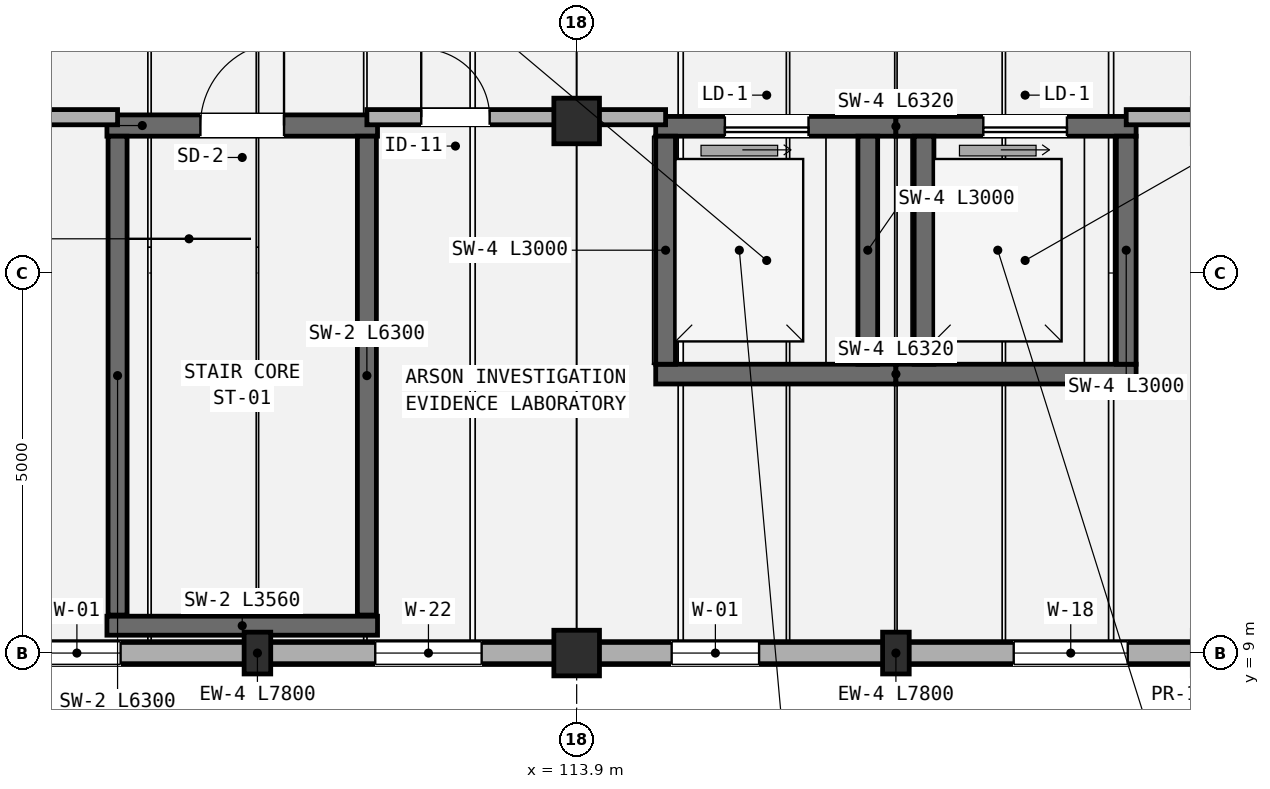
"""IFC4 building model, lengths in metres.
Left out: names, types, materials, properties, quantities, classifications, styles, units other than length and angle.
Written with IfcOpenShell. Run it as: python <this file> out.ifc"""

import sys

from ifc_helpers import new_model, si_unit, direction, frame, frame_2d, origin, origin_2d, place, context, subcontext, project, spatial, polyline, rectangle, outline, extrude, element, fill, save


model = new_model("IFC4")
c1 = context("Model", 3, precision=1e-05, world=origin(), true_north=direction((0.0, 1.0)))
c2 = subcontext(c1, "Body", "Model", "MODEL_VIEW")
j1 = project(units=[si_unit("LENGTHUNIT", "METRE"), si_unit("PLANEANGLEUNIT", "RADIAN")], contexts=[c1])
p1 = place(None, origin())
s1 = spatial("IfcSite", under=j1, at=p1, CompositionType="ELEMENT")
p2 = place(p1, origin())
s2 = spatial("IfcBuilding", under=s1, at=p2, CompositionType="ELEMENT")
p3 = place(p2, frame((0.0, 0.0, 12.75)))
s3 = spatial("IfcBuildingStorey", under=s2, at=p3, CompositionType="ELEMENT", Elevation=12.75)
for number, where, z_axis, x_axis in (
    (1, (113.9, 9.0, 0.0), (0.0, 0.0, 1.0), (1.0, 0.0, 0.0)),
    (2, (113.9, 16.0, 0.0), (0.0, 0.0, 1.0), (1.0, 0.0, 0.0)),
):
    element("IfcColumn", number, at=place(p3, frame(where, z_axis=z_axis, x_axis=x_axis)), inside=s3, PredefinedType="COLUMN", context=c2, shape_type="SweptSolid", body=[
        extrude(rectangle(XDim=0.6, YDim=0.6, at=origin_2d()), origin(), (0.0, 0.0, 1.0), 3.0),
    ])
for number, where, z_axis, x_axis in (
    (3, (109.7, 9.0, 0.0), (0.0, 0.0, 1.0), (1.0, 0.0, 0.0)),
    (4, (118.1, 9.0, 0.0), (0.0, 0.0, 1.0), (1.0, 0.0, 0.0)),
):
    element("IfcColumn", number, at=place(p3, frame(where, z_axis=z_axis, x_axis=x_axis)), inside=s3, PredefinedType="PILASTER", context=c2, shape_type="SweptSolid", body=[
        extrude(rectangle(XDim=0.35, YDim=0.55, at=origin_2d()), origin(), (0.0, 0.0, 1.0), 3.0),
    ])
p4 = place(p3, frame((105.8, 9.0, 0.0), z_axis=(0.0, 0.0, 1.0), x_axis=(1.0, 0.0, 0.0)))
e5 = element("IfcWall", 5, at=p4, inside=s3, PredefinedType="STANDARD", context=c2, shape_type="SweptSolid", body=[
    extrude(rectangle(XDim=7.8, YDim=0.3, at=frame_2d((3.9, 0.0))), origin(), (0.0, 0.0, 1.0), 2.29),
])
p5 = place(p4, frame((0.95, 0.0, 0.6)))
e6 = element("IfcOpeningElement", 6, at=p5, cuts=e5, PredefinedType="OPENING", context=c2, shape_type="SweptSolid", body=[
    extrude(rectangle(XDim=1.15, YDim=1.45, at=frame_2d((0.575, 0.725))), frame((0.0, 0.16, 0.0), z_axis=(0.0, -1.0, 0.0), x_axis=(1.0, 0.0, 0.0)), (0.0, 0.0, 1.0), 0.32),
])
p6 = place(p4, frame((5.45, 0.0, 0.6)))
e7 = element("IfcOpeningElement", 7, at=p6, cuts=e5, PredefinedType="OPENING", context=c2, shape_type="SweptSolid", body=[
    extrude(rectangle(XDim=1.4, YDim=1.45, at=frame_2d((0.7, 0.725))), frame((0.0, 0.16, 0.0), z_axis=(0.0, -1.0, 0.0), x_axis=(1.0, 0.0, 0.0)), (0.0, 0.0, 1.0), 0.32),
])
p7 = place(p3, frame((114.2, 9.0, 0.0), z_axis=(0.0, 0.0, 1.0), x_axis=(1.0, 0.0, 0.0)))
e8 = element("IfcWall", 8, at=p7, inside=s3, PredefinedType="STANDARD", context=c2, shape_type="SweptSolid", body=[
    extrude(rectangle(XDim=7.8, YDim=0.3, at=frame_2d((3.9, 0.0))), origin(), (0.0, 0.0, 1.0), 2.29),
])
p8 = place(p7, frame((0.95, 0.0, 0.6)))
e9 = element("IfcOpeningElement", 9, at=p8, cuts=e8, PredefinedType="OPENING", context=c2, shape_type="SweptSolid", body=[
    extrude(rectangle(XDim=1.15, YDim=1.45, at=frame_2d((0.575, 0.725))), frame((0.0, 0.16, 0.0), z_axis=(0.0, -1.0, 0.0), x_axis=(1.0, 0.0, 0.0)), (0.0, 0.0, 1.0), 0.32),
])
p9 = place(p7, frame((5.45, 0.0, 0.65)))
e10 = element("IfcOpeningElement", 10, at=p9, cuts=e8, PredefinedType="OPENING", context=c2, shape_type="SweptSolid", body=[
    extrude(rectangle(XDim=1.5, YDim=1.4, at=frame_2d((0.75, 0.7))), frame((0.0, 0.16, 0.0), z_axis=(0.0, -1.0, 0.0), x_axis=(1.0, 0.0, 0.0)), (0.0, 0.0, 1.0), 0.32),
])
p10 = place(p3, frame((105.5, 9.0, 3.0), z_axis=(0.0, 0.0, 1.0), x_axis=(1.0, 0.0, 0.0)))
e11 = element("IfcWall", 11, at=p10, inside=s3, PredefinedType="PARAPET", context=c2, shape_type="SweptSolid", body=[
    extrude(outline(polyline([(0.0, 0.0), (8.4, 0.0), (8.4, 0.8), (7.468, 0.8), (7.467, 0.913), (6.534, 0.913), (6.533, 1.025), (5.601, 1.025), (5.6, 1.137), (4.668, 1.137), (4.667, 1.25), (3.734, 1.25), (3.733, 1.137), (2.801, 1.137), (2.8, 1.025), (1.868, 1.025), (1.867, 0.913), (0.934, 0.913), (0.933, 0.8), (0.0, 0.8), (0.0, 0.0)])), frame((0.0, 0.14, 0.0), z_axis=(0.0, -1.0, 0.0), x_axis=(1.0, 0.0, 0.0)), (0.0, 0.0, 1.0), 0.28),
])
p11 = place(p3, frame((113.9, 9.0, 3.0), z_axis=(0.0, 0.0, 1.0), x_axis=(1.0, 0.0, 0.0)))
e12 = element("IfcWall", 12, at=p11, inside=s3, PredefinedType="PARAPET", context=c2, shape_type="SweptSolid", body=[
    extrude(outline(polyline([(0.0, 0.0), (8.4, 0.0), (8.4, 0.8), (7.468, 0.8), (7.467, 0.913), (6.534, 0.913), (6.533, 1.025), (5.601, 1.025), (5.6, 1.137), (4.668, 1.137), (4.667, 1.25), (3.734, 1.25), (3.733, 1.137), (2.801, 1.137), (2.8, 1.025), (1.868, 1.025), (1.867, 0.913), (0.934, 0.913), (0.933, 0.8), (0.0, 0.8), (0.0, 0.0)])), frame((0.0, 0.14, 0.0), z_axis=(0.0, -1.0, 0.0), x_axis=(1.0, 0.0, 0.0)), (0.0, 0.0, 1.0), 0.28),
])
p12 = place(p3, frame((107.72, 15.94, 0.0), z_axis=(0.0, 0.0, 1.0), x_axis=(1.0, 0.0, 0.0)))
e13 = element("IfcWall", 13, at=p12, inside=s3, PredefinedType="SHEAR", context=c2, shape_type="SweptSolid", body=[
    extrude(rectangle(XDim=3.56, YDim=0.28, at=frame_2d((1.78, 0.0))), origin(), (0.0, 0.0, 1.0), 2.9),
])
p13 = place(p12, frame((1.23, 0.0, 0.0)))
e14 = element("IfcOpeningElement", 14, at=p13, cuts=e13, PredefinedType="OPENING", context=c2, shape_type="SweptSolid", body=[
    extrude(rectangle(XDim=1.1, YDim=2.15, at=frame_2d((0.55, 1.075))), frame((0.0, 0.15, 0.0), z_axis=(0.0, -1.0, 0.0), x_axis=(1.0, 0.0, 0.0)), (0.0, 0.0, 1.0), 0.3),
])
p14 = place(p3, frame((111.28, 9.36, 0.0), z_axis=(0.0, 0.0, 1.0), x_axis=(-1.0, 0.0, 0.0)))
e15 = element("IfcWall", 15, at=p14, inside=s3, PredefinedType="SHEAR", context=c2, shape_type="SweptSolid", body=[
    extrude(rectangle(XDim=3.56, YDim=0.25, at=frame_2d((1.78, 0.0))), origin(), (0.0, 0.0, 1.0), 2.9),
])
for number, where, z_axis, x_axis in (
    (16, (107.86, 15.8, 0.0), (0.0, 0.0, 1.0), (0.0, -1.0, 0.0)),
    (17, (111.14, 9.5, 0.0), (0.0, 0.0, 1.0), (0.0, 1.0, 0.0)),
):
    element("IfcWall", number, at=place(p3, frame(where, z_axis=z_axis, x_axis=x_axis)), inside=s3, PredefinedType="SHEAR", context=c2, shape_type="SweptSolid", body=[
        extrude(rectangle(XDim=6.3, YDim=0.25, at=frame_2d((3.15, 0.0))), origin(), (0.0, 0.0, 1.0), 2.9),
    ])
p15 = place(p3, frame((114.94, 12.67, 0.0), z_axis=(0.0, 0.0, 1.0), x_axis=(1.0, 0.0, 0.0)))
e18 = element("IfcWall", 18, at=p15, inside=s3, PredefinedType="SHEAR", context=c2, shape_type="SweptSolid", body=[
    extrude(rectangle(XDim=3.16, YDim=0.26, at=frame_2d((1.58, 0.0))), origin(), (0.0, 0.0, 1.0), 2.9),
])
p16 = place(p3, frame((118.1, 15.93, 0.0), z_axis=(0.0, 0.0, 1.0), x_axis=(-1.0, 0.0, 0.0)))
e19 = element("IfcWall", 19, at=p16, inside=s3, PredefinedType="SHEAR", context=c2, shape_type="SweptSolid", body=[
    extrude(rectangle(XDim=3.16, YDim=0.26, at=frame_2d((1.58, 0.0))), origin(), (0.0, 0.0, 1.0), 2.9),
])
p17 = place(p16, frame((1.15, 0.0, 0.0)))
e20 = element("IfcOpeningElement", 20, at=p17, cuts=e19, PredefinedType="OPENING", context=c2, shape_type="SweptSolid", body=[
    extrude(rectangle(XDim=1.1, YDim=2.15, at=frame_2d((0.55, 1.075))), frame((0.0, 0.14, 0.0), z_axis=(0.0, -1.0, 0.0), x_axis=(1.0, 0.0, 0.0)), (0.0, 0.0, 1.0), 0.28),
])
for number, where, z_axis, x_axis in (
    (21, (115.07, 15.8, 0.0), (0.0, 0.0, 1.0), (0.0, -1.0, 0.0)),
    (22, (117.73, 12.8, 0.0), (0.0, 0.0, 1.0), (0.0, 1.0, 0.0)),
):
    element("IfcWall", number, at=place(p3, frame(where, z_axis=z_axis, x_axis=x_axis)), inside=s3, PredefinedType="SHEAR", context=c2, shape_type="SweptSolid", body=[
        extrude(rectangle(XDim=3.0, YDim=0.26, at=frame_2d((1.5, 0.0))), origin(), (0.0, 0.0, 1.0), 2.9),
    ])
p18 = place(p3, frame((118.1, 12.67, 0.0), z_axis=(0.0, 0.0, 1.0), x_axis=(1.0, 0.0, 0.0)))
e23 = element("IfcWall", 23, at=p18, inside=s3, PredefinedType="SHEAR", context=c2, shape_type="SweptSolid", body=[
    extrude(rectangle(XDim=3.16, YDim=0.26, at=frame_2d((1.58, 0.0))), origin(), (0.0, 0.0, 1.0), 2.9),
])
p19 = place(p3, frame((121.26, 15.93, 0.0), z_axis=(0.0, 0.0, 1.0), x_axis=(-1.0, 0.0, 0.0)))
e24 = element("IfcWall", 24, at=p19, inside=s3, PredefinedType="SHEAR", context=c2, shape_type="SweptSolid", body=[
    extrude(rectangle(XDim=3.16, YDim=0.26, at=frame_2d((1.58, 0.0))), origin(), (0.0, 0.0, 1.0), 2.9),
])
p20 = place(p19, frame((0.91, 0.0, 0.0)))
e25 = element("IfcOpeningElement", 25, at=p20, cuts=e24, PredefinedType="OPENING", context=c2, shape_type="SweptSolid", body=[
    extrude(rectangle(XDim=1.1, YDim=2.15, at=frame_2d((0.55, 1.075))), frame((0.0, 0.14, 0.0), z_axis=(0.0, -1.0, 0.0), x_axis=(1.0, 0.0, 0.0)), (0.0, 0.0, 1.0), 0.28),
])
for number, where, z_axis, x_axis in (
    (26, (118.47, 15.8, 0.0), (0.0, 0.0, 1.0), (0.0, -1.0, 0.0)),
    (27, (121.13, 12.8, 0.0), (0.0, 0.0, 1.0), (0.0, 1.0, 0.0)),
):
    element("IfcWall", number, at=place(p3, frame(where, z_axis=z_axis, x_axis=x_axis)), inside=s3, PredefinedType="SHEAR", context=c2, shape_type="SweptSolid", body=[
        extrude(rectangle(XDim=3.0, YDim=0.26, at=frame_2d((1.5, 0.0))), origin(), (0.0, 0.0, 1.0), 2.9),
    ])
p21 = place(p3, frame((105.65, 16.05, 0.0), z_axis=(0.0, 0.0, 1.0), x_axis=(1.0, 0.0, 0.0)))
e28 = element("IfcWall", 28, at=p21, inside=s3, PredefinedType="PARTITIONING", context=c2, shape_type="SweptSolid", body=[
    extrude(rectangle(XDim=2.21, YDim=0.2, at=frame_2d((1.105, 0.0))), origin(), (0.0, 0.0, 1.0), 2.3),
])
p22 = place(p3, frame((111.14, 16.05, 0.0), z_axis=(0.0, 0.0, 1.0), x_axis=(1.0, 0.0, 0.0)))
e29 = element("IfcWall", 29, at=p22, inside=s3, PredefinedType="PARTITIONING", context=c2, shape_type="SweptSolid", body=[
    extrude(rectangle(XDim=3.93, YDim=0.2, at=frame_2d((1.965, 0.0))), origin(), (0.0, 0.0, 1.0), 2.3),
])
p23 = place(p22, frame((0.715, 0.0, 0.0)))
e30 = element("IfcOpeningElement", 30, at=p23, cuts=e29, PredefinedType="OPENING", context=c2, shape_type="SweptSolid", body=[
    extrude(rectangle(XDim=0.9, YDim=2.08, at=frame_2d((0.45, 1.04))), frame((0.0, 0.11, 0.0), z_axis=(0.0, -1.0, 0.0), x_axis=(1.0, 0.0, 0.0)), (0.0, 0.0, 1.0), 0.22),
])
p24 = place(p3, frame((121.13, 16.05, 0.0), z_axis=(0.0, 0.0, 1.0), x_axis=(1.0, 0.0, 0.0)))
e31 = element("IfcWall", 31, at=p24, inside=s3, PredefinedType="PARTITIONING", context=c2, shape_type="SweptSolid", body=[
    extrude(rectangle(XDim=3.73, YDim=0.2, at=frame_2d((1.865, 0.0))), origin(), (0.0, 0.0, 1.0), 2.3),
])
p25 = place(p5, origin())
e32 = element("IfcWindow", 32, at=p25, inside=s3, PartitioningType="SINGLE_PANEL", PredefinedType="WINDOW", context=c2, shape_type="SweptSolid", body=[
    extrude(rectangle(XDim=1.15, YDim=1.45, at=frame_2d((0.575, 0.725))), frame((0.0, 0.03, 0.0), z_axis=(0.0, -1.0, 0.0), x_axis=(1.0, 0.0, 0.0)), (0.0, 0.0, 1.0), 0.06),
])
fill(e6, e32)
p26 = place(p6, origin())
e33 = element("IfcWindow", 33, at=p26, inside=s3, PartitioningType="DOUBLE_PANEL_VERTICAL", PredefinedType="WINDOW", context=c2, shape_type="SweptSolid", body=[
    extrude(rectangle(XDim=1.4, YDim=1.45, at=frame_2d((0.7, 0.725))), frame((0.0, 0.03, 0.0), z_axis=(0.0, -1.0, 0.0), x_axis=(1.0, 0.0, 0.0)), (0.0, 0.0, 1.0), 0.06),
])
fill(e7, e33)
p27 = place(p8, origin())
e34 = element("IfcWindow", 34, at=p27, inside=s3, PartitioningType="SINGLE_PANEL", PredefinedType="WINDOW", context=c2, shape_type="SweptSolid", body=[
    extrude(rectangle(XDim=1.15, YDim=1.45, at=frame_2d((0.575, 0.725))), frame((0.0, 0.03, 0.0), z_axis=(0.0, -1.0, 0.0), x_axis=(1.0, 0.0, 0.0)), (0.0, 0.0, 1.0), 0.06),
])
fill(e9, e34)
p28 = place(p9, origin())
e35 = element("IfcWindow", 35, at=p28, inside=s3, PartitioningType="DOUBLE_PANEL_VERTICAL", PredefinedType="WINDOW", context=c2, shape_type="SweptSolid", body=[
    extrude(rectangle(XDim=1.5, YDim=1.4, at=frame_2d((0.75, 0.7))), frame((0.0, 0.03, 0.0), z_axis=(0.0, -1.0, 0.0), x_axis=(1.0, 0.0, 0.0)), (0.0, 0.0, 1.0), 0.06),
])
fill(e10, e35)
p29 = place(p13, origin())
e36 = element("IfcDoor", 36, at=p29, inside=s3, OperationType="SINGLE_SWING_RIGHT", PredefinedType="DOOR", context=c2, shape_type="SweptSolid", body=[
    extrude(rectangle(XDim=1.1, YDim=2.15, at=frame_2d((0.55, 1.075))), frame((0.0, 0.025, 0.0), z_axis=(0.0, -1.0, 0.0), x_axis=(1.0, 0.0, 0.0)), (0.0, 0.0, 1.0), 0.05),
])
fill(e14, e36)
p30 = place(p17, origin())
e37 = element("IfcDoor", 37, at=p30, inside=s3, OperationType="SLIDING_TO_LEFT", PredefinedType="DOOR", context=c2, shape_type="SweptSolid", body=[
    extrude(rectangle(XDim=1.1, YDim=2.15, at=frame_2d((0.55, 1.075))), frame((0.0, 0.025, 0.0), z_axis=(0.0, -1.0, 0.0), x_axis=(1.0, 0.0, 0.0)), (0.0, 0.0, 1.0), 0.05),
])
fill(e20, e37)
p31 = place(p20, origin())
e38 = element("IfcDoor", 38, at=p31, inside=s3, OperationType="SLIDING_TO_LEFT", PredefinedType="DOOR", context=c2, shape_type="SweptSolid", body=[
    extrude(rectangle(XDim=1.1, YDim=2.15, at=frame_2d((0.55, 1.075))), frame((0.0, 0.025, 0.0), z_axis=(0.0, -1.0, 0.0), x_axis=(1.0, 0.0, 0.0)), (0.0, 0.0, 1.0), 0.05),
])
fill(e25, e38)
p32 = place(p23, origin())
e39 = element("IfcDoor", 39, at=p32, inside=s3, OperationType="SINGLE_SWING_LEFT", PredefinedType="DOOR", context=c2, shape_type="SweptSolid", body=[
    extrude(rectangle(XDim=0.9, YDim=2.08, at=frame_2d((0.45, 1.04))), frame((0.0, 0.025, 0.0), z_axis=(0.0, -1.0, 0.0), x_axis=(1.0, 0.0, 0.0)), (0.0, 0.0, 1.0), 0.05),
])
fill(e30, e39)
save(model, sys.argv[1])
